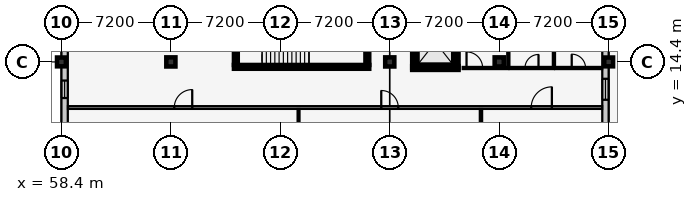
"""IFC4 building model, lengths in metres.
Left out: names, types, materials, properties, quantities, classifications, styles, units other than length and angle.
Written with IfcOpenShell. Run it as: python <this file> out.ifc"""

import sys

from ifc_helpers import new_model, si_unit, direction, frame, frame_2d, origin, origin_2d, place, context, subcontext, project, spatial, rectangle, extrude, element, fill, save


model = new_model("IFC4")
c1 = context("Model", 3, precision=1e-05, world=origin(), true_north=direction((0.0, 1.0)))
c2 = subcontext(c1, "Body", "Model", "MODEL_VIEW")
j1 = project(units=[si_unit("LENGTHUNIT", "METRE"), si_unit("PLANEANGLEUNIT", "RADIAN")], contexts=[c1])
p1 = place(None, origin())
s1 = spatial("IfcSite", under=j1, at=p1, CompositionType="ELEMENT")
p2 = place(p1, origin())
s2 = spatial("IfcBuilding", under=s1, at=p2, CompositionType="ELEMENT")
p3 = place(p2, frame((0.0, 0.0, 13.8)))
s3 = spatial("IfcBuildingStorey", under=s2, at=p3, CompositionType="ELEMENT", Elevation=13.8)
p4 = place(p3, frame((58.4, 14.4, 0.0), z_axis=(0.0, 0.0, 1.0), x_axis=(1.0, 0.0, 0.0)))
e1 = element("IfcColumn", 1, at=p4, inside=s3, PredefinedType="COLUMN", context=c2, shape_type="SweptSolid", body=[
    extrude(rectangle(XDim=0.58, YDim=0.58, at=origin_2d()), origin(), (0.0, 0.0, 1.0), 4.2),
])
for number, where, z_axis, x_axis in (
    (2, (65.6, 14.4, 0.0), (0.0, 0.0, 1.0), (1.0, 0.0, 0.0)),
    (3, (80.0, 14.4, 0.0), (0.0, 0.0, 1.0), (1.0, 0.0, 0.0)),
    (4, (87.2, 14.4, 0.0), (0.0, 0.0, 1.0), (1.0, 0.0, 0.0)),
):
    element("IfcColumn", number, at=place(p3, frame(where, z_axis=z_axis, x_axis=x_axis)), inside=s3, PredefinedType="COLUMN", context=c2, shape_type="SweptSolid", body=[
        extrude(rectangle(XDim=0.6, YDim=0.6, at=origin_2d()), origin(), (0.0, 0.0, 1.0), 4.2),
    ])
p5 = place(p3, frame((94.4, 14.4, 0.0), z_axis=(0.0, 0.0, 1.0), x_axis=(1.0, 0.0, 0.0)))
e5 = element("IfcColumn", 5, at=p5, inside=s3, PredefinedType="COLUMN", context=c2, shape_type="SweptSolid", body=[
    extrude(rectangle(XDim=0.58, YDim=0.58, at=origin_2d()), origin(), (0.0, 0.0, 1.0), 4.2),
])
p6 = place(p3, frame((94.19, 21.6, 0.0), z_axis=(0.0, 0.0, 1.0), x_axis=(0.0, -1.0, 0.0)))
e6 = element("IfcWall", 6, at=p6, inside=s3, PredefinedType="SOLIDWALL", context=c2, shape_type="SweptSolid", body=[
    extrude(rectangle(XDim=21.6, YDim=0.42, at=frame_2d((10.8, 0.0))), origin(), (0.0, 0.0, 1.0), 3.135),
])
p7 = place(p6, frame((1.225, 0.0, 0.9)))
e7 = element("IfcOpeningElement", 7, at=p7, cuts=e6, PredefinedType="OPENING", context=c2, shape_type="SweptSolid", body=[
    extrude(rectangle(XDim=1.15, YDim=1.6, at=frame_2d((0.575, 0.8))), frame((0.0, 0.222, 0.0), z_axis=(0.0, -1.0, 0.0), x_axis=(1.0, 0.0, 0.0)), (0.0, 0.0, 1.0), 0.444),
])
p8 = place(p6, frame((4.775, 0.0, 0.9)))
e8 = element("IfcOpeningElement", 8, at=p8, cuts=e6, PredefinedType="OPENING", context=c2, shape_type="SweptSolid", body=[
    extrude(rectangle(XDim=1.25, YDim=1.6, at=frame_2d((0.625, 0.8))), frame((0.0, 0.222, 0.0), z_axis=(0.0, -1.0, 0.0), x_axis=(1.0, 0.0, 0.0)), (0.0, 0.0, 1.0), 0.444),
])
p9 = place(p6, frame((8.31, 0.0, 0.9)))
e9 = element("IfcOpeningElement", 9, at=p9, cuts=e6, PredefinedType="OPENING", context=c2, shape_type="SweptSolid", body=[
    extrude(rectangle(XDim=1.38, YDim=1.6, at=frame_2d((0.69, 0.8))), frame((0.0, 0.222, 0.0), z_axis=(0.0, -1.0, 0.0), x_axis=(1.0, 0.0, 0.0)), (0.0, 0.0, 1.0), 0.444),
])
p10 = place(p6, frame((11.85, 0.0, 0.9)))
e10 = element("IfcOpeningElement", 10, at=p10, cuts=e6, PredefinedType="OPENING", context=c2, shape_type="SweptSolid", body=[
    extrude(rectangle(XDim=1.5, YDim=1.6, at=frame_2d((0.75, 0.8))), frame((0.0, 0.222, 0.0), z_axis=(0.0, -1.0, 0.0), x_axis=(1.0, 0.0, 0.0)), (0.0, 0.0, 1.0), 0.444),
])
p11 = place(p6, frame((15.7, 0.0, 0.9)))
e11 = element("IfcOpeningElement", 11, at=p11, cuts=e6, PredefinedType="OPENING", context=c2, shape_type="SweptSolid", body=[
    extrude(rectangle(XDim=1.0, YDim=1.75, at=frame_2d((0.5, 0.875))), frame((0.0, 0.222, 0.0), z_axis=(0.0, -1.0, 0.0), x_axis=(1.0, 0.0, 0.0)), (0.0, 0.0, 1.0), 0.444),
])
p12 = place(p6, frame((19.24, 0.0, 0.9)))
e12 = element("IfcOpeningElement", 12, at=p12, cuts=e6, PredefinedType="OPENING", context=c2, shape_type="SweptSolid", body=[
    extrude(rectangle(XDim=1.12, YDim=1.75, at=frame_2d((0.56, 0.875))), frame((0.0, 0.222, 0.0), z_axis=(0.0, -1.0, 0.0), x_axis=(1.0, 0.0, 0.0)), (0.0, 0.0, 1.0), 0.444),
])
p13 = place(p3, frame((58.61, 0.0, 0.0), z_axis=(0.0, 0.0, 1.0), x_axis=(0.0, 1.0, 0.0)))
e13 = element("IfcWall", 13, at=p13, inside=s3, PredefinedType="SOLIDWALL", context=c2, shape_type="SweptSolid", body=[
    extrude(rectangle(XDim=21.6, YDim=0.42, at=frame_2d((10.8, 0.0))), origin(), (0.0, 0.0, 1.0), 3.215),
])
p14 = place(p13, frame((1.1, 0.0, 0.9)))
e14 = element("IfcOpeningElement", 14, at=p14, cuts=e13, PredefinedType="OPENING", context=c2, shape_type="SweptSolid", body=[
    extrude(rectangle(XDim=1.4, YDim=1.35, at=frame_2d((0.7, 0.675))), frame((0.0, 0.222, 0.0), z_axis=(0.0, -1.0, 0.0), x_axis=(1.0, 0.0, 0.0)), (0.0, 0.0, 1.0), 0.444),
])
p15 = place(p13, frame((4.925, 0.0, 0.9)))
e15 = element("IfcOpeningElement", 15, at=p15, cuts=e13, PredefinedType="OPENING", context=c2, shape_type="SweptSolid", body=[
    extrude(rectangle(XDim=0.95, YDim=1.45, at=frame_2d((0.475, 0.725))), frame((0.0, 0.222, 0.0), z_axis=(0.0, -1.0, 0.0), x_axis=(1.0, 0.0, 0.0)), (0.0, 0.0, 1.0), 0.444),
])
p16 = place(p13, frame((8.475, 0.0, 0.9)))
e16 = element("IfcOpeningElement", 16, at=p16, cuts=e13, PredefinedType="OPENING", context=c2, shape_type="SweptSolid", body=[
    extrude(rectangle(XDim=1.05, YDim=1.45, at=frame_2d((0.525, 0.725))), frame((0.0, 0.222, 0.0), z_axis=(0.0, -1.0, 0.0), x_axis=(1.0, 0.0, 0.0)), (0.0, 0.0, 1.0), 0.444),
])
p17 = place(p13, frame((12.025, 0.0, 0.9)))
e17 = element("IfcOpeningElement", 17, at=p17, cuts=e13, PredefinedType="OPENING", context=c2, shape_type="SweptSolid", body=[
    extrude(rectangle(XDim=1.15, YDim=1.45, at=frame_2d((0.575, 0.725))), frame((0.0, 0.222, 0.0), z_axis=(0.0, -1.0, 0.0), x_axis=(1.0, 0.0, 0.0)), (0.0, 0.0, 1.0), 0.444),
])
p18 = place(p13, frame((15.575, 0.0, 0.9)))
e18 = element("IfcOpeningElement", 18, at=p18, cuts=e13, PredefinedType="OPENING", context=c2, shape_type="SweptSolid", body=[
    extrude(rectangle(XDim=1.25, YDim=1.45, at=frame_2d((0.625, 0.725))), frame((0.0, 0.222, 0.0), z_axis=(0.0, -1.0, 0.0), x_axis=(1.0, 0.0, 0.0)), (0.0, 0.0, 1.0), 0.444),
])
p19 = place(p13, frame((19.125, 0.0, 0.9)))
e19 = element("IfcOpeningElement", 19, at=p19, cuts=e13, PredefinedType="OPENING", context=c2, shape_type="SweptSolid", body=[
    extrude(rectangle(XDim=1.35, YDim=1.45, at=frame_2d((0.675, 0.725))), frame((0.0, 0.222, 0.0), z_axis=(0.0, -1.0, 0.0), x_axis=(1.0, 0.0, 0.0)), (0.0, 0.0, 1.0), 0.444),
])
p20 = place(p3, frame((69.75, 14.075, 0.0), z_axis=(0.0, 0.0, 1.0), x_axis=(1.0, 0.0, 0.0)))
e20 = element("IfcWall", 20, at=p20, inside=s3, PredefinedType="SHEAR", context=c2, shape_type="SweptSolid", body=[
    extrude(rectangle(XDim=8.9, YDim=0.25, at=frame_2d((4.45, 0.0))), origin(), (0.0, 0.0, 1.0), 3.88),
])
p21 = place(p3, frame((69.875, 17.65, 0.0), z_axis=(0.0, 0.0, 1.0), x_axis=(0.0, -1.0, 0.0)))
e21 = element("IfcWall", 21, at=p21, inside=s3, PredefinedType="SHEAR", context=c2, shape_type="SweptSolid", body=[
    extrude(rectangle(XDim=3.45, YDim=0.25, at=frame_2d((1.725, 0.0))), origin(), (0.0, 0.0, 1.0), 3.88),
])
p22 = place(p21, frame((1.15, 0.0, 0.0)))
e22 = element("IfcOpeningElement", 22, at=p22, cuts=e21, PredefinedType="OPENING", context=c2, shape_type="SweptSolid", body=[
    extrude(rectangle(XDim=1.15, YDim=2.15, at=frame_2d((0.575, 1.075))), frame((0.0, 0.137, 0.0), z_axis=(0.0, -1.0, 0.0), x_axis=(1.0, 0.0, 0.0)), (0.0, 0.0, 1.0), 0.274),
])
p23 = place(p3, frame((78.525, 14.2, 0.0), z_axis=(0.0, 0.0, 1.0), x_axis=(0.0, 1.0, 0.0)))
e23 = element("IfcWall", 23, at=p23, inside=s3, PredefinedType="SHEAR", context=c2, shape_type="SweptSolid", body=[
    extrude(rectangle(XDim=3.45, YDim=0.25, at=frame_2d((1.725, 0.0))), origin(), (0.0, 0.0, 1.0), 3.88),
])
p24 = place(p3, frame((81.475, 14.0, 0.0), z_axis=(0.0, 0.0, 1.0), x_axis=(1.0, 0.0, 0.0)))
e24 = element("IfcWall", 24, at=p24, inside=s3, PredefinedType="SHEAR", context=c2, shape_type="SweptSolid", body=[
    extrude(rectangle(XDim=3.05, YDim=0.25, at=frame_2d((1.525, 0.0))), origin(), (0.0, 0.0, 1.0), 3.88),
])
p25 = place(p24, frame((0.725, 0.0, 0.0)))
e25 = element("IfcOpeningElement", 25, at=p25, cuts=e24, PredefinedType="OPENING", context=c2, shape_type="SweptSolid", body=[
    extrude(rectangle(XDim=1.6, YDim=2.3, at=frame_2d((0.8, 1.15))), frame((0.0, 0.137, 0.0), z_axis=(0.0, -1.0, 0.0), x_axis=(1.0, 0.0, 0.0)), (0.0, 0.0, 1.0), 0.274),
])
for number, where, z_axis, x_axis in (
    (26, (81.6, 17.4, 0.0), (0.0, 0.0, 1.0), (0.0, -1.0, 0.0)),
    (27, (84.4, 14.0, 0.0), (0.0, 0.0, 1.0), (0.0, 1.0, 0.0)),
):
    element("IfcWall", number, at=place(p3, frame(where, z_axis=z_axis, x_axis=x_axis)), inside=s3, PredefinedType="SHEAR", context=c2, shape_type="SweptSolid", body=[
        extrude(rectangle(XDim=3.4, YDim=0.25, at=frame_2d((1.7, 0.0))), origin(), (0.0, 0.0, 1.0), 3.88),
    ])
p26 = place(p3, frame((58.83, 11.4, 0.0), z_axis=(0.0, 0.0, 1.0), x_axis=(1.0, 0.0, 0.0)))
e28 = element("IfcWall", 28, at=p26, inside=s3, PredefinedType="PARTITIONING", context=c2, shape_type="SweptSolid", body=[
    extrude(rectangle(XDim=35.14, YDim=0.18, at=frame_2d((17.57, 0.0))), origin(), (0.0, 0.0, 1.0), 3.88),
])
p27 = place(p26, frame((6.995, 0.0, 0.0)))
e29 = element("IfcOpeningElement", 29, at=p27, cuts=e28, PredefinedType="OPENING", context=c2, shape_type="SweptSolid", body=[
    extrude(rectangle(XDim=1.18, YDim=2.2, at=frame_2d((0.59, 1.1))), frame((0.0, 0.102, 0.0), z_axis=(0.0, -1.0, 0.0), x_axis=(1.0, 0.0, 0.0)), (0.0, 0.0, 1.0), 0.204),
])
p28 = place(p26, frame((20.61, 0.0, 0.0)))
e30 = element("IfcOpeningElement", 30, at=p28, cuts=e28, PredefinedType="OPENING", context=c2, shape_type="SweptSolid", body=[
    extrude(rectangle(XDim=1.12, YDim=2.15, at=frame_2d((0.56, 1.075))), frame((0.0, 0.102, 0.0), z_axis=(0.0, -1.0, 0.0), x_axis=(1.0, 0.0, 0.0)), (0.0, 0.0, 1.0), 0.204),
])
p29 = place(p26, frame((30.475, 0.0, 0.0)))
e31 = element("IfcOpeningElement", 31, at=p29, cuts=e28, PredefinedType="OPENING", context=c2, shape_type="SweptSolid", body=[
    extrude(rectangle(XDim=1.36, YDim=2.2, at=frame_2d((0.68, 1.1))), frame((0.0, 0.102, 0.0), z_axis=(0.0, -1.0, 0.0), x_axis=(1.0, 0.0, 0.0)), (0.0, 0.0, 1.0), 0.204),
])
p30 = place(p3, frame((74.0, 0.43, 0.0), z_axis=(0.0, 0.0, 1.0), x_axis=(0.0, 1.0, 0.0)))
e32 = element("IfcWall", 32, at=p30, inside=s3, PredefinedType="PARTITIONING", context=c2, shape_type="SweptSolid", body=[
    extrude(rectangle(XDim=10.87, YDim=0.125, at=frame_2d((5.435, 0.0))), origin(), (0.0, 0.0, 1.0), 3.88),
])
p31 = place(p3, frame((86.0, 0.43, 0.0), z_axis=(0.0, 0.0, 1.0), x_axis=(0.0, 1.0, 0.0)))
e33 = element("IfcWall", 33, at=p31, inside=s3, PredefinedType="PARTITIONING", context=c2, shape_type="SweptSolid", body=[
    extrude(rectangle(XDim=10.87, YDim=0.15, at=frame_2d((5.435, 0.0))), origin(), (0.0, 0.0, 1.0), 3.88),
])
p32 = place(p3, frame((84.8, 14.0, 0.0), z_axis=(0.0, 0.0, 1.0), x_axis=(1.0, 0.0, 0.0)))
e34 = element("IfcWall", 34, at=p32, inside=s3, PredefinedType="PARTITIONING", context=c2, shape_type="SweptSolid", body=[
    extrude(rectangle(XDim=3.0, YDim=0.14, at=frame_2d((1.5, 0.0))), origin(), (0.0, 0.0, 1.0), 3.88),
])
p33 = place(p32, frame((0.25, 0.0, 0.0)))
e35 = element("IfcOpeningElement", 35, at=p33, cuts=e34, PredefinedType="OPENING", context=c2, shape_type="SweptSolid", body=[
    extrude(rectangle(XDim=1.06, YDim=2.1, at=frame_2d((0.53, 1.05))), frame((0.0, 0.082, 0.0), z_axis=(0.0, -1.0, 0.0), x_axis=(1.0, 0.0, 0.0)), (0.0, 0.0, 1.0), 0.164),
])
p34 = place(p3, frame((87.8, 14.08, 0.0), z_axis=(0.0, 0.0, 1.0), x_axis=(0.0, 1.0, 0.0)))
e36 = element("IfcWall", 36, at=p34, inside=s3, PredefinedType="PARTITIONING", context=c2, shape_type="SweptSolid", body=[
    extrude(rectangle(XDim=7.09, YDim=0.14, at=frame_2d((3.545, 0.0))), origin(), (0.0, 0.0, 1.0), 3.88),
])
p35 = place(p3, frame((87.88, 14.0, 0.0), z_axis=(0.0, 0.0, 1.0), x_axis=(1.0, 0.0, 0.0)))
e37 = element("IfcWall", 37, at=p35, inside=s3, PredefinedType="PARTITIONING", context=c2, shape_type="SweptSolid", body=[
    extrude(rectangle(XDim=2.92, YDim=0.14, at=frame_2d((1.46, 0.0))), origin(), (0.0, 0.0, 1.0), 3.88),
])
p36 = place(p35, frame((1.015, 0.0, 0.0)))
e38 = element("IfcOpeningElement", 38, at=p36, cuts=e37, PredefinedType="OPENING", context=c2, shape_type="SweptSolid", body=[
    extrude(rectangle(XDim=0.89, YDim=2.05, at=frame_2d((0.445, 1.025))), frame((0.0, 0.082, 0.0), z_axis=(0.0, -1.0, 0.0), x_axis=(1.0, 0.0, 0.0)), (0.0, 0.0, 1.0), 0.164),
])
p37 = place(p3, frame((90.8, 14.08, 0.0), z_axis=(0.0, 0.0, 1.0), x_axis=(0.0, 1.0, 0.0)))
e39 = element("IfcWall", 39, at=p37, inside=s3, PredefinedType="PARTITIONING", context=c2, shape_type="SweptSolid", body=[
    extrude(rectangle(XDim=7.09, YDim=0.14, at=frame_2d((3.545, 0.0))), origin(), (0.0, 0.0, 1.0), 3.495),
])
p38 = place(p3, frame((90.88, 14.0, 0.0), z_axis=(0.0, 0.0, 1.0), x_axis=(1.0, 0.0, 0.0)))
e40 = element("IfcWall", 40, at=p38, inside=s3, PredefinedType="PARTITIONING", context=c2, shape_type="SweptSolid", body=[
    extrude(rectangle(XDim=3.09, YDim=0.14, at=frame_2d((1.545, 0.0))), origin(), (0.0, 0.0, 1.0), 3.88),
])
p39 = place(p38, frame((1.09, 0.0, 0.0)))
e41 = element("IfcOpeningElement", 41, at=p39, cuts=e40, PredefinedType="OPENING", context=c2, shape_type="SweptSolid", body=[
    extrude(rectangle(XDim=0.91, YDim=2.06, at=frame_2d((0.455, 1.03))), frame((0.0, 0.082, 0.0), z_axis=(0.0, -1.0, 0.0), x_axis=(1.0, 0.0, 0.0)), (0.0, 0.0, 1.0), 0.164),
])
p40 = place(p9, origin())
e42 = element("IfcWindow", 42, at=p40, inside=s3, PartitioningType="SINGLE_PANEL", PredefinedType="WINDOW", context=c2, shape_type="SweptSolid", body=[
    extrude(rectangle(XDim=1.38, YDim=1.6, at=frame_2d((0.69, 0.8))), frame((0.0, 0.03, 0.0), z_axis=(0.0, -1.0, 0.0), x_axis=(1.0, 0.0, 0.0)), (0.0, 0.0, 1.0), 0.06),
])
fill(e9, e42)
p41 = place(p17, origin())
e43 = element("IfcWindow", 43, at=p41, inside=s3, PartitioningType="SINGLE_PANEL", PredefinedType="WINDOW", context=c2, shape_type="SweptSolid", body=[
    extrude(rectangle(XDim=1.15, YDim=1.45, at=frame_2d((0.575, 0.725))), frame((0.0, 0.03, 0.0), z_axis=(0.0, -1.0, 0.0), x_axis=(1.0, 0.0, 0.0)), (0.0, 0.0, 1.0), 0.06),
])
fill(e17, e43)
p42 = place(p25, origin())
e44 = element("IfcDoor", 44, at=p42, inside=s3, OperationType="DOUBLE_DOOR_SLIDING", PredefinedType="DOOR", context=c2, shape_type="SweptSolid", body=[
    extrude(rectangle(XDim=1.6, YDim=2.3, at=frame_2d((0.8, 1.15))), frame((0.0, 0.025, 0.0), z_axis=(0.0, -1.0, 0.0), x_axis=(1.0, 0.0, 0.0)), (0.0, 0.0, 1.0), 0.05),
])
fill(e25, e44)
p43 = place(p27, origin())
e45 = element("IfcDoor", 45, at=p43, inside=s3, OperationType="SINGLE_SWING_RIGHT", PredefinedType="DOOR", context=c2, shape_type="SweptSolid", body=[
    extrude(rectangle(XDim=1.18, YDim=2.2, at=frame_2d((0.59, 1.1))), frame((0.0, 0.025, 0.0), z_axis=(0.0, -1.0, 0.0), x_axis=(1.0, 0.0, 0.0)), (0.0, 0.0, 1.0), 0.05),
])
fill(e29, e45)
p44 = place(p28, origin())
e46 = element("IfcDoor", 46, at=p44, inside=s3, OperationType="SINGLE_SWING_LEFT", PredefinedType="DOOR", context=c2, shape_type="SweptSolid", body=[
    extrude(rectangle(XDim=1.12, YDim=2.15, at=frame_2d((0.56, 1.075))), frame((0.0, 0.025, 0.0), z_axis=(0.0, -1.0, 0.0), x_axis=(1.0, 0.0, 0.0)), (0.0, 0.0, 1.0), 0.05),
])
fill(e30, e46)
p45 = place(p29, origin())
e47 = element("IfcDoor", 47, at=p45, inside=s3, OperationType="SINGLE_SWING_RIGHT", PredefinedType="DOOR", context=c2, shape_type="SweptSolid", body=[
    extrude(rectangle(XDim=1.36, YDim=2.2, at=frame_2d((0.68, 1.1))), frame((0.0, 0.025, 0.0), z_axis=(0.0, -1.0, 0.0), x_axis=(1.0, 0.0, 0.0)), (0.0, 0.0, 1.0), 0.05),
])
fill(e31, e47)
p46 = place(p33, origin())
e48 = element("IfcDoor", 48, at=p46, inside=s3, OperationType="SINGLE_SWING_LEFT", PredefinedType="DOOR", context=c2, shape_type="SweptSolid", body=[
    extrude(rectangle(XDim=1.06, YDim=2.1, at=frame_2d((0.53, 1.05))), frame((0.0, 0.025, 0.0), z_axis=(0.0, -1.0, 0.0), x_axis=(1.0, 0.0, 0.0)), (0.0, 0.0, 1.0), 0.05),
])
fill(e35, e48)
p47 = place(p36, origin())
e49 = element("IfcDoor", 49, at=p47, inside=s3, OperationType="SINGLE_SWING_RIGHT", PredefinedType="DOOR", context=c2, shape_type="SweptSolid", body=[
    extrude(rectangle(XDim=0.89, YDim=2.05, at=frame_2d((0.445, 1.025))), frame((0.0, 0.025, 0.0), z_axis=(0.0, -1.0, 0.0), x_axis=(1.0, 0.0, 0.0)), (0.0, 0.0, 1.0), 0.05),
])
fill(e38, e49)
p48 = place(p39, origin())
e50 = element("IfcDoor", 50, at=p48, inside=s3, OperationType="SINGLE_SWING_LEFT", PredefinedType="DOOR", context=c2, shape_type="SweptSolid", body=[
    extrude(rectangle(XDim=0.91, YDim=2.06, at=frame_2d((0.455, 1.03))), frame((0.0, 0.025, 0.0), z_axis=(0.0, -1.0, 0.0), x_axis=(1.0, 0.0, 0.0)), (0.0, 0.0, 1.0), 0.05),
])
fill(e41, e50)
save(model, sys.argv[1])
